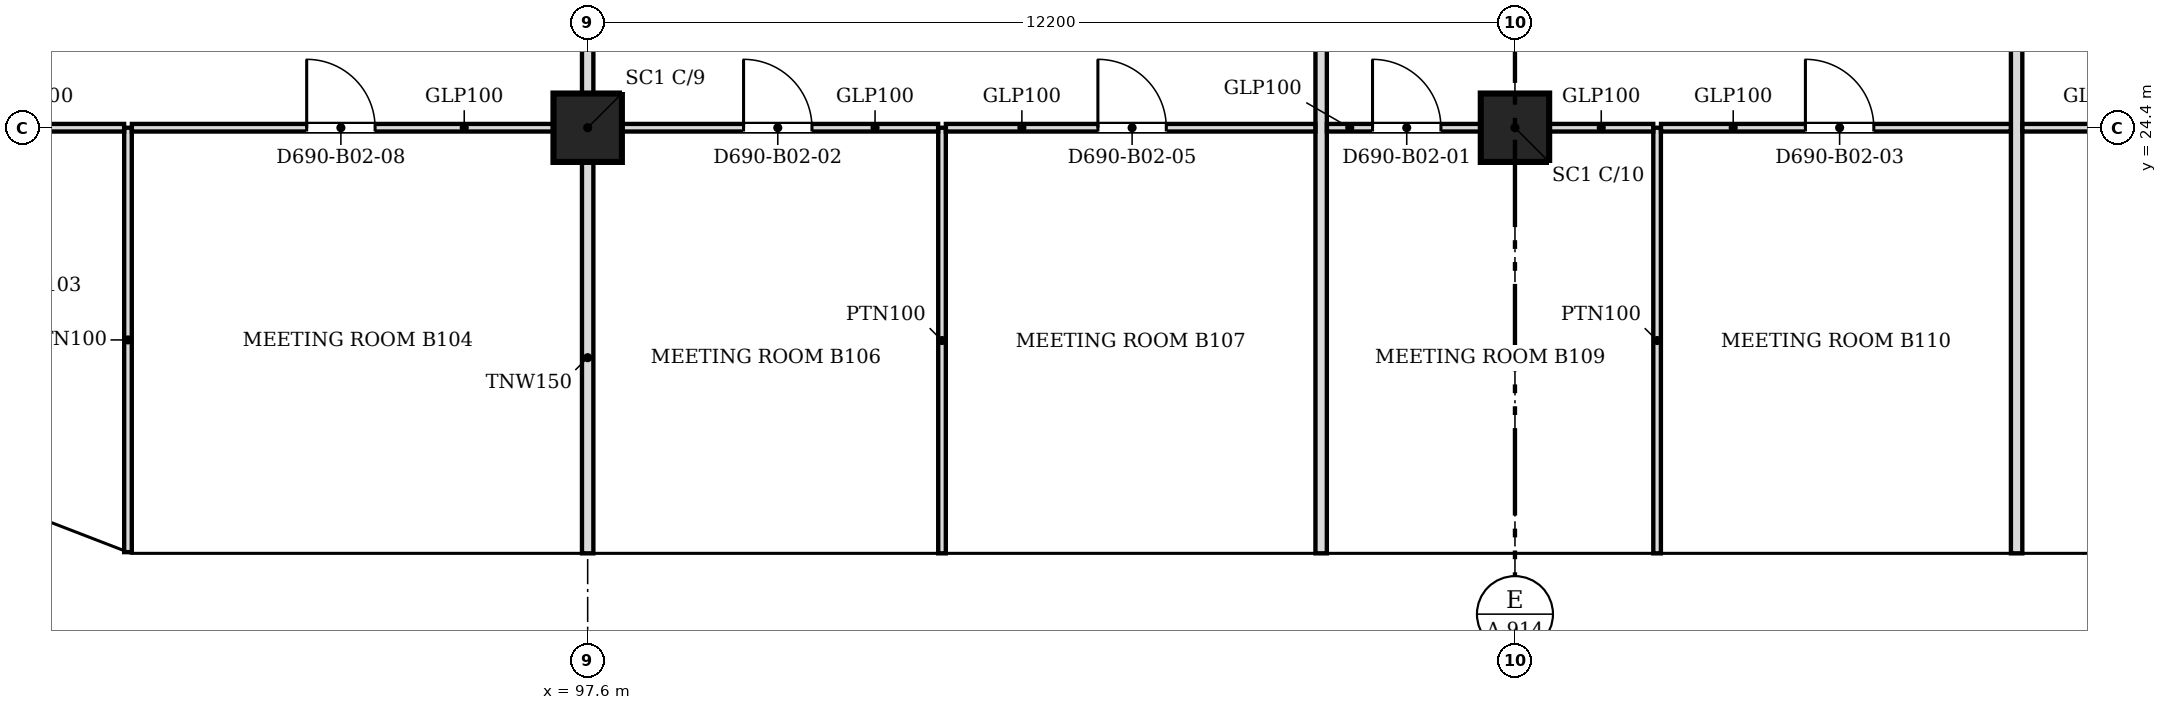
"""IFC4 building model, lengths in metres.
Left out: names, types, materials, properties, quantities, classifications, styles, units other than length and angle.
Written with IfcOpenShell. Run it as: python <this file> out.ifc"""

import sys

from ifc_helpers import new_model, si_unit, direction, frame, frame_2d, origin, origin_2d, place, context, subcontext, project, spatial, polyline, rectangle, outline, extrude, faceted_brep, source, transform, mapped, element, fill, save


model = new_model("IFC4")
c1 = context("Model", 3, precision=1e-05, world=origin(), true_north=direction((0.0, 1.0)))
c2 = subcontext(c1, "Body", "Model", "MODEL_VIEW")
j1 = project(units=[si_unit("LENGTHUNIT", "METRE"), si_unit("PLANEANGLEUNIT", "RADIAN")], contexts=[c1])
p1 = place(None, origin())
s1 = spatial("IfcSite", under=j1, at=p1, CompositionType="ELEMENT")
p2 = place(p1, origin())
s2 = spatial("IfcBuilding", under=s1, at=p2, CompositionType="ELEMENT")
p3 = place(p2, frame((0.0, 0.0, 21.3)))
s3 = spatial("IfcBuildingStorey", under=s2, at=p3, CompositionType="ELEMENT", Elevation=21.3)
for number, where, z_axis, x_axis in (
    (1, (97.6, 24.4, 0.0), (0.0, 0.0, 1.0), (1.0, 0.0, 0.0)),
    (2, (109.8, 24.4, 0.0), (0.0, 0.0, 1.0), (1.0, 0.0, 0.0)),
):
    element("IfcColumn", number, at=place(p3, frame(where, z_axis=z_axis, x_axis=x_axis)), inside=s3, PredefinedType="COLUMN", context=c2, shape_type="SweptSolid", body=[
        extrude(rectangle(XDim=0.9, YDim=0.9, at=origin_2d()), origin(), (0.0, 0.0, 1.0), 4.3),
    ])
m1 = source(origin(), c2, "Body", "Brep", [
    faceted_brep([(3.003, -0.25, 0.0), (6.053, -0.25, 4.5), (3.003, -0.25, 9.0), (0.0, -0.25, 4.5), (0.047, 0.25, 4.57), (3.003, 0.25, 9.0), (6.053, 0.25, 4.5), (3.003, 0.25, 0.0), (0.047, 0.25, 4.43), (0.0, 0.0, 4.5)], [[[0, 1, 2, 3]], [[4, 5, 6, 7, 8]], [[7, 6, 1, 0]], [[6, 5, 2, 1]], [[5, 4, 9, 3, 2]], [[8, 7, 0, 3, 9]], [[8, 9, 4]]]),
])
p4 = place(p3, frame((91.547, 18.55, -4.5), z_axis=(0.0, 0.0, 1.0), x_axis=(1.0, 0.0, 0.0)))
e3 = element("IfcWall", 3, at=p4, inside=s3, PredefinedType="SOLIDWALL", context=c2, shape_type="MappedRepresentation", body=[
    mapped(m1, transform((0.0, 0.0, 0.0), scale=1.0)),
])
m2 = source(origin(), c2, "Body", "SweptSolid", [
    extrude(outline(polyline([(3.005, 0.448), (5.751, 4.5), (3.005, 8.552), (0.301, 4.5), (3.005, 0.448)])), frame((0.0, 0.26, 0.0), z_axis=(0.0, -1.0, 0.0), x_axis=(1.0, 0.0, 0.0)), (0.0, 0.0, 1.0), 0.52),
])
p5 = place(p4, origin())
e4 = element("IfcOpeningElement", 4, at=p5, cuts=e3, PredefinedType="OPENING", context=c2, shape_type="MappedRepresentation", body=[
    mapped(m2, transform((0.0, 0.0, 0.0), scale=1.0)),
])
m3 = source(origin(), c2, "Body", "Brep", [
    faceted_brep([(3.05, -0.25, 0.0), (6.1, -0.25, 4.5), (6.1, -0.25, 4.5), (3.05, -0.25, 9.0), (0.0, -0.25, 4.5), (0.0, 0.25, 4.5), (3.05, 0.25, 9.0), (6.1, 0.25, 4.5), (6.1, 0.25, 4.5), (3.05, 0.25, 0.0)], [[[0, 1, 2, 3, 4]], [[5, 6, 7, 8, 9]], [[9, 8, 1, 0]], [[7, 6, 3, 2]], [[6, 5, 4, 3]], [[5, 9, 0, 4]], [[1, 8, 7, 2]]]),
])
p6 = place(p3, frame((97.6, 18.55, -4.5), z_axis=(0.0, 0.0, 1.0), x_axis=(1.0, 0.0, 0.0)))
e5 = element("IfcWall", 5, at=p6, inside=s3, PredefinedType="SOLIDWALL", context=c2, shape_type="MappedRepresentation", body=[
    mapped(m3, transform((0.0, 0.0, 0.0), scale=1.0)),
])
m4 = source(origin(), c2, "Body", "SweptSolid", [
    extrude(outline(polyline([(3.05, 0.446), (5.798, 4.5), (3.05, 8.554), (0.302, 4.5), (3.05, 0.446)])), frame((0.0, 0.26, 0.0), z_axis=(0.0, -1.0, 0.0), x_axis=(1.0, 0.0, 0.0)), (0.0, 0.0, 1.0), 0.52),
])
p7 = place(p6, origin())
e6 = element("IfcOpeningElement", 6, at=p7, cuts=e5, PredefinedType="OPENING", context=c2, shape_type="MappedRepresentation", body=[
    mapped(m4, transform((0.0, 0.0, 0.0), scale=1.0)),
])
m5 = source(origin(), c2, "Body", "SweptSolid", [
    extrude(outline(polyline([(3.05, 0.0), (6.1, 4.5), (3.05, 9.0), (0.0, 4.5), (3.05, 0.0)])), frame((0.0, 0.25, 0.0), z_axis=(0.0, -1.0, 0.0), x_axis=(1.0, 0.0, 0.0)), (0.0, 0.0, 1.0), 0.5),
])
p8 = place(p3, frame((103.7, 18.55, -4.5), z_axis=(0.0, 0.0, 1.0), x_axis=(1.0, 0.0, 0.0)))
e7 = element("IfcWall", 7, at=p8, inside=s3, PredefinedType="SOLIDWALL", context=c2, shape_type="MappedRepresentation", body=[
    mapped(m5, transform((0.0, 0.0, 0.0), scale=1.0)),
])
p9 = place(p8, origin())
e8 = element("IfcOpeningElement", 8, at=p9, cuts=e7, PredefinedType="OPENING", context=c2, shape_type="MappedRepresentation", body=[
    mapped(m4, transform((0.0, 0.0, 0.0), scale=1.0)),
])
p10 = place(p3, frame((109.8, 18.55, -4.5), z_axis=(0.0, 0.0, 1.0), x_axis=(1.0, 0.0, 0.0)))
e9 = element("IfcWall", 9, at=p10, inside=s3, PredefinedType="SOLIDWALL", context=c2, shape_type="MappedRepresentation", body=[
    mapped(m3, transform((0.0, 0.0, 0.0), scale=1.0)),
])
p11 = place(p10, origin())
e10 = element("IfcOpeningElement", 10, at=p11, cuts=e9, PredefinedType="OPENING", context=c2, shape_type="MappedRepresentation", body=[
    mapped(m4, transform((0.0, 0.0, 0.0), scale=1.0)),
])
p12 = place(p3, frame((115.9, 18.55, -4.5), z_axis=(0.0, 0.0, 1.0), x_axis=(1.0, 0.0, 0.0)))
e11 = element("IfcWall", 11, at=p12, inside=s3, PredefinedType="SOLIDWALL", context=c2, shape_type="MappedRepresentation", body=[
    mapped(m5, transform((0.0, 0.0, 0.0), scale=1.0)),
])
p13 = place(p12, origin())
e12 = element("IfcOpeningElement", 12, at=p13, cuts=e11, PredefinedType="OPENING", context=c2, shape_type="MappedRepresentation", body=[
    mapped(m4, transform((0.0, 0.0, 0.0), scale=1.0)),
])
m6 = source(origin(), c2, "Body", "Brep", [
    faceted_brep([(0.053, -0.25, 0.0), (3.003, -0.25, 4.5), (0.053, -0.25, 9.0), (0.0, -0.25, 8.919), (0.0, -0.25, 0.081), (0.106, 0.25, 8.919), (2.957, 0.25, 4.571), (2.957, 0.25, 4.429), (0.106, 0.25, 0.081), (3.003, 0.0, 4.5), (0.053, 0.0, 0.0), (0.053, 0.0, 9.0)], [[[0, 1, 2, 3, 4]], [[5, 6, 7, 8]], [[8, 7, 9, 1, 0, 10]], [[6, 5, 11, 2, 1, 9]], [[3, 2, 11]], [[10, 0, 4]], [[8, 10, 4, 3, 11, 5]], [[9, 7, 6]]]),
])
p14 = place(p3, frame((88.744, 19.631, -4.5), z_axis=(0.0, 0.0, 1.0), x_axis=(0.932997369089, -0.359883188373, 0.0)))
e13 = element("IfcWall", 13, at=p14, inside=s3, PredefinedType="SOLIDWALL", context=c2, shape_type="MappedRepresentation", body=[
    mapped(m6, transform((0.0, 0.0, 0.0), scale=1.0)),
])
m7 = source(origin(), c2, "Body", "SweptSolid", [
    extrude(outline(polyline([(0.253, 0.761), (2.705, 4.5), (0.253, 8.239), (0.253, 0.761)])), frame((0.0, 0.26, 0.0), z_axis=(0.0, -1.0, 0.0), x_axis=(1.0, 0.0, 0.0)), (0.0, 0.0, 1.0), 0.52),
])
p15 = place(p14, origin())
e14 = element("IfcOpeningElement", 14, at=p15, cuts=e13, PredefinedType="OPENING", context=c2, shape_type="MappedRepresentation", body=[
    mapped(m7, transform((0.0, 0.0, 0.0), scale=1.0)),
])
m8 = source(origin(), c2, "Body", "Brep", [
    faceted_brep([(0.047, -0.25, 0.0), (3.05, -0.25, 4.5), (0.0, -0.25, 4.5), (0.0, -0.25, 0.071), (0.093, 0.25, 4.5), (3.05, 0.25, 4.5), (0.093, 0.25, 0.07), (0.047, 0.0, 0.0)], [[[0, 1, 2, 3]], [[4, 5, 6]], [[6, 5, 1, 0, 7]], [[5, 4, 2, 1]], [[7, 0, 3]], [[6, 7, 3, 2, 4]]]),
])
p16 = place(p3, frame((91.5, 18.55, 0.0), z_axis=(0.0, 0.0, 1.0), x_axis=(1.0, 0.0, 0.0)))
e15 = element("IfcWall", 15, at=p16, inside=s3, PredefinedType="SOLIDWALL", context=c2, shape_type="MappedRepresentation", body=[
    mapped(m8, transform((0.0, 0.0, 0.0), scale=1.0)),
])
m9 = source(origin(), c2, "Body", "SweptSolid", [
    extrude(outline(polyline([(0.247, 0.75), (2.583, 4.25), (0.247, 4.25), (0.247, 0.75)])), frame((0.0, 0.26, 0.0), z_axis=(0.0, -1.0, 0.0), x_axis=(1.0, 0.0, 0.0)), (0.0, 0.0, 1.0), 0.52),
])
p17 = place(p16, origin())
e16 = element("IfcOpeningElement", 16, at=p17, cuts=e15, PredefinedType="OPENING", context=c2, shape_type="MappedRepresentation", body=[
    mapped(m9, transform((0.0, 0.0, 0.0), scale=1.0)),
])
m10 = source(origin(), c2, "Body", "Brep", [
    faceted_brep([(2.95, -0.25, 0.0), (2.997, -0.25, 0.07), (2.997, -0.25, 4.5), (0.0, -0.25, 4.5), (0.053, 0.25, 4.5), (2.904, 0.25, 4.5), (2.904, 0.25, 0.071), (0.053, 0.25, 4.419), (2.95, 0.0, 0.0), (0.0, 0.0, 4.5)], [[[0, 1, 2, 3]], [[4, 5, 6, 7]], [[1, 0, 8]], [[5, 4, 9, 3, 2]], [[7, 6, 8, 0, 3, 9]], [[7, 9, 4]], [[1, 8, 6, 5, 2]]]),
])
p18 = place(p3, frame((88.794, 19.612, 0.0), z_axis=(0.0, 0.0, 1.0), x_axis=(0.933000876937, -0.359874094142, 0.0)))
e17 = element("IfcWall", 17, at=p18, inside=s3, PredefinedType="SOLIDWALL", context=c2, shape_type="MappedRepresentation", body=[
    mapped(m10, transform((0.0, 0.0, 0.0), scale=1.0)),
])
m11 = source(origin(), c2, "Body", "SweptSolid", [
    extrude(outline(polyline([(2.75, 4.25), (0.463, 4.25), (2.75, 0.761), (2.75, 4.25)])), frame((0.0, 0.26, 0.0), z_axis=(0.0, -1.0, 0.0), x_axis=(1.0, 0.0, 0.0)), (0.0, 0.0, 1.0), 0.52),
])
p19 = place(p18, origin())
e18 = element("IfcOpeningElement", 18, at=p19, cuts=e17, PredefinedType="OPENING", context=c2, shape_type="MappedRepresentation", body=[
    mapped(m11, transform((0.0, 0.0, 0.0), scale=1.0)),
])
m12 = source(origin(), c2, "Body", "Brep", [
    faceted_brep([(3.05, -0.25, 0.0), (6.1, -0.25, 4.5), (6.1, -0.25, 4.5), (0.0, -0.25, 4.5), (0.0, 0.25, 4.5), (6.1, 0.25, 4.5), (6.1, 0.25, 4.5), (3.05, 0.25, 0.0)], [[[0, 1, 2, 3]], [[4, 5, 6, 7]], [[7, 6, 1, 0]], [[5, 4, 3, 2]], [[4, 7, 0, 3]], [[1, 6, 5, 2]]]),
])
p20 = place(p3, frame((94.55, 18.55, 0.0), z_axis=(0.0, 0.0, 1.0), x_axis=(1.0, 0.0, 0.0)))
e19 = element("IfcWall", 19, at=p20, inside=s3, PredefinedType="SOLIDWALL", context=c2, shape_type="MappedRepresentation", body=[
    mapped(m12, transform((0.0, 0.0, 0.0), scale=1.0)),
])
m13 = source(origin(), c2, "Body", "SweptSolid", [
    extrude(outline(polyline([(3.05, 0.446), (5.629, 4.25), (0.471, 4.25), (3.05, 0.446)])), frame((0.0, 0.26, 0.0), z_axis=(0.0, -1.0, 0.0), x_axis=(1.0, 0.0, 0.0)), (0.0, 0.0, 1.0), 0.52),
])
p21 = place(p20, origin())
e20 = element("IfcOpeningElement", 20, at=p21, cuts=e19, PredefinedType="OPENING", context=c2, shape_type="MappedRepresentation", body=[
    mapped(m13, transform((0.0, 0.0, 0.0), scale=1.0)),
])
m14 = source(origin(), c2, "Body", "SweptSolid", [
    extrude(outline(polyline([(3.05, 0.0), (6.1, 4.5), (0.0, 4.5), (3.05, 0.0)])), frame((0.0, 0.25, 0.0), z_axis=(0.0, -1.0, 0.0), x_axis=(1.0, 0.0, 0.0)), (0.0, 0.0, 1.0), 0.5),
])
p22 = place(p3, frame((100.65, 18.55, 0.0), z_axis=(0.0, 0.0, 1.0), x_axis=(1.0, 0.0, 0.0)))
e21 = element("IfcWall", 21, at=p22, inside=s3, PredefinedType="SOLIDWALL", context=c2, shape_type="MappedRepresentation", body=[
    mapped(m14, transform((0.0, 0.0, 0.0), scale=1.0)),
])
p23 = place(p22, origin())
e22 = element("IfcOpeningElement", 22, at=p23, cuts=e21, PredefinedType="OPENING", context=c2, shape_type="MappedRepresentation", body=[
    mapped(m13, transform((0.0, 0.0, 0.0), scale=1.0)),
])
p24 = place(p3, frame((106.75, 18.55, 0.0), z_axis=(0.0, 0.0, 1.0), x_axis=(1.0, 0.0, 0.0)))
e23 = element("IfcWall", 23, at=p24, inside=s3, PredefinedType="SOLIDWALL", context=c2, shape_type="MappedRepresentation", body=[
    mapped(m14, transform((0.0, 0.0, 0.0), scale=1.0)),
])
p25 = place(p24, origin())
e24 = element("IfcOpeningElement", 24, at=p25, cuts=e23, PredefinedType="OPENING", context=c2, shape_type="MappedRepresentation", body=[
    mapped(m13, transform((0.0, 0.0, 0.0), scale=1.0)),
])
p26 = place(p3, frame((112.85, 18.55, 0.0), z_axis=(0.0, 0.0, 1.0), x_axis=(1.0, 0.0, 0.0)))
e25 = element("IfcWall", 25, at=p26, inside=s3, PredefinedType="SOLIDWALL", context=c2, shape_type="MappedRepresentation", body=[
    mapped(m12, transform((0.0, 0.0, 0.0), scale=1.0)),
])
p27 = place(p26, origin())
e26 = element("IfcOpeningElement", 26, at=p27, cuts=e25, PredefinedType="OPENING", context=c2, shape_type="MappedRepresentation", body=[
    mapped(m13, transform((0.0, 0.0, 0.0), scale=1.0)),
])
p28 = place(p3, frame((97.6, 18.8, 0.0), z_axis=(0.0, 0.0, 1.0), x_axis=(0.0, 1.0, 0.0)))
e27 = element("IfcWall", 27, at=p28, inside=s3, PredefinedType="PARTITIONING", context=c2, shape_type="SweptSolid", body=[
    extrude(rectangle(XDim=5.149, YDim=0.15, at=frame_2d((2.574, 0.0))), origin(), (0.0, 0.0, 1.0), 3.767),
])
p29 = place(p3, frame((102.262, 18.8, 0.0), z_axis=(0.0, 0.0, 1.0), x_axis=(0.0, 1.0, 0.0)))
e28 = element("IfcWall", 28, at=p29, inside=s3, PredefinedType="PARTITIONING", context=c2, shape_type="SweptSolid", body=[
    extrude(rectangle(XDim=5.6, YDim=0.1, at=frame_2d((2.8, 0.0))), origin(), (0.0, 0.0, 1.0), 3.767),
])
p30 = place(p3, frame((107.25, 18.8, 0.0), z_axis=(0.0, 0.0, 1.0), x_axis=(0.0, 1.0, 0.0)))
e29 = element("IfcWall", 29, at=p30, inside=s3, PredefinedType="PARTITIONING", context=c2, shape_type="SweptSolid", body=[
    extrude(rectangle(XDim=14.924, YDim=0.15, at=frame_2d((7.462, 0.0))), origin(), (0.0, 0.0, 1.0), 3.767),
])
p31 = place(p3, frame((111.67, 18.8, 0.0), z_axis=(0.0, 0.0, 1.0), x_axis=(0.0, 1.0, 0.0)))
e30 = element("IfcWall", 30, at=p31, inside=s3, PredefinedType="PARTITIONING", context=c2, shape_type="SweptSolid", body=[
    extrude(rectangle(XDim=5.6, YDim=0.1, at=frame_2d((2.8, 0.0))), origin(), (0.0, 0.0, 1.0), 3.767),
])
p32 = place(p3, frame((116.4, 18.8, 0.0), z_axis=(0.0, 0.0, 1.0), x_axis=(0.0, 1.0, 0.0)))
e31 = element("IfcWall", 31, at=p32, inside=s3, PredefinedType="PARTITIONING", context=c2, shape_type="SweptSolid", body=[
    extrude(rectangle(XDim=14.924, YDim=0.15, at=frame_2d((7.462, 0.0))), origin(), (0.0, 0.0, 1.0), 3.767),
])
p33 = place(p3, frame((91.552, 18.816, 0.0), z_axis=(0.0, 0.0, 1.0), x_axis=(0.0, 1.0, 0.0)))
e32 = element("IfcWall", 32, at=p33, inside=s3, PredefinedType="PARTITIONING", context=c2, shape_type="SweptSolid", body=[
    extrude(rectangle(XDim=5.584, YDim=0.1, at=frame_2d((2.792, 0.0))), origin(), (0.0, 0.0, 1.0), 3.767),
])
p34 = place(p3, frame((91.501, 24.4, 0.0), z_axis=(0.0, 0.0, 1.0), x_axis=(-1.0, 0.0, 0.0)))
e33 = element("IfcWall", 33, at=p34, inside=s3, PredefinedType="PARTITIONING", context=c2, shape_type="SweptSolid", body=[
    extrude(rectangle(XDim=5.565, YDim=0.1, at=frame_2d((2.783, 0.0))), origin(), (0.0, 0.0, 1.0), 3.767),
])
m15 = source(origin(), c2, "Body", "SweptSolid", [
    extrude(rectangle(XDim=0.9, YDim=2.1, at=frame_2d((0.45, 1.05))), frame((0.0, 0.06, 0.0), z_axis=(0.0, -1.0, 0.0), x_axis=(1.0, 0.0, 0.0)), (0.0, 0.0, 1.0), 0.12),
])
p35 = place(p34, frame((2.365, 0.0, 0.0)))
e34 = element("IfcOpeningElement", 34, at=p35, cuts=e33, PredefinedType="OPENING", context=c2, shape_type="MappedRepresentation", body=[
    mapped(m15, transform((0.0, 0.0, 0.0), scale=1.0)),
])
p36 = place(p3, frame((97.149, 24.4, 0.0), z_axis=(0.0, 0.0, 1.0), x_axis=(-1.0, 0.0, 0.0)))
e35 = element("IfcWall", 35, at=p36, inside=s3, PredefinedType="PARTITIONING", context=c2, shape_type="SweptSolid", body=[
    extrude(rectangle(XDim=5.546, YDim=0.1, at=frame_2d((2.773, 0.0))), origin(), (0.0, 0.0, 1.0), 3.767),
])
p37 = place(p36, frame((2.346, 0.0, 0.0)))
e36 = element("IfcOpeningElement", 36, at=p37, cuts=e35, PredefinedType="OPENING", context=c2, shape_type="MappedRepresentation", body=[
    mapped(m15, transform((0.0, 0.0, 0.0), scale=1.0)),
])
p38 = place(p3, frame((102.211, 24.4, 0.0), z_axis=(0.0, 0.0, 1.0), x_axis=(-1.0, 0.0, 0.0)))
e37 = element("IfcWall", 37, at=p38, inside=s3, PredefinedType="PARTITIONING", context=c2, shape_type="SweptSolid", body=[
    extrude(rectangle(XDim=4.16, YDim=0.1, at=frame_2d((2.08, 0.0))), origin(), (0.0, 0.0, 1.0), 3.767),
])
p39 = place(p38, frame((1.66, 0.0, 0.0)))
e38 = element("IfcOpeningElement", 38, at=p39, cuts=e37, PredefinedType="OPENING", context=c2, shape_type="MappedRepresentation", body=[
    mapped(m15, transform((0.0, 0.0, 0.0), scale=1.0)),
])
p40 = place(p3, frame((107.174, 24.4, 0.0), z_axis=(0.0, 0.0, 1.0), x_axis=(-1.0, 0.0, 0.0)))
e39 = element("IfcWall", 39, at=p40, inside=s3, PredefinedType="PARTITIONING", context=c2, shape_type="SweptSolid", body=[
    extrude(rectangle(XDim=4.861, YDim=0.1, at=frame_2d((2.431, 0.0))), origin(), (0.0, 0.0, 1.0), 3.767),
])
p41 = place(p40, frame((1.961, 0.0, 0.0)))
e40 = element("IfcOpeningElement", 40, at=p41, cuts=e39, PredefinedType="OPENING", context=c2, shape_type="MappedRepresentation", body=[
    mapped(m15, transform((0.0, 0.0, 0.0), scale=1.0)),
])
p42 = place(p3, frame((109.349, 24.4, 0.0), z_axis=(0.0, 0.0, 1.0), x_axis=(-1.0, 0.0, 0.0)))
e41 = element("IfcWall", 41, at=p42, inside=s3, PredefinedType="PARTITIONING", context=c2, shape_type="SweptSolid", body=[
    extrude(rectangle(XDim=2.023, YDim=0.1, at=frame_2d((1.012, 0.0))), origin(), (0.0, 0.0, 1.0), 3.767),
])
p43 = place(p42, frame((0.523, 0.0, 0.0)))
e42 = element("IfcOpeningElement", 42, at=p43, cuts=e41, PredefinedType="OPENING", context=c2, shape_type="MappedRepresentation", body=[
    mapped(m15, transform((0.0, 0.0, 0.0), scale=1.0)),
])
p44 = place(p3, frame((110.251, 24.4, 0.0), z_axis=(0.0, 0.0, 1.0), x_axis=(1.0, 0.0, 0.0)))
e43 = element("IfcWall", 43, at=p44, inside=s3, PredefinedType="PARTITIONING", context=c2, shape_type="SweptSolid", body=[
    extrude(rectangle(XDim=1.368, YDim=0.1, at=frame_2d((0.684, 0.0))), origin(), (0.0, 0.0, 1.0), 3.767),
])
p45 = place(p3, frame((116.324, 24.4, 0.0), z_axis=(0.0, 0.0, 1.0), x_axis=(-1.0, 0.0, 0.0)))
e44 = element("IfcWall", 44, at=p45, inside=s3, PredefinedType="PARTITIONING", context=c2, shape_type="SweptSolid", body=[
    extrude(rectangle(XDim=4.603, YDim=0.1, at=frame_2d((2.301, 0.0))), origin(), (0.0, 0.0, 1.0), 3.767),
])
p46 = place(p45, frame((1.803, 0.0, 0.0)))
e45 = element("IfcOpeningElement", 45, at=p46, cuts=e44, PredefinedType="OPENING", context=c2, shape_type="MappedRepresentation", body=[
    mapped(m15, transform((0.0, 0.0, 0.0), scale=1.0)),
])
p47 = place(p3, frame((121.549, 24.4, 0.0), z_axis=(0.0, 0.0, 1.0), x_axis=(-1.0, 0.0, 0.0)))
e46 = element("IfcWall", 46, at=p47, inside=s3, PredefinedType="PARTITIONING", context=c2, shape_type="SweptSolid", body=[
    extrude(rectangle(XDim=5.073, YDim=0.1, at=frame_2d((2.537, 0.0))), origin(), (0.0, 0.0, 1.0), 3.767),
])
p48 = place(p47, frame((2.073, 0.0, 0.0)))
e47 = element("IfcOpeningElement", 47, at=p48, cuts=e46, PredefinedType="OPENING", context=c2, shape_type="MappedRepresentation", body=[
    mapped(m15, transform((0.0, 0.0, 0.0), scale=1.0)),
])
p49 = place(p3, frame((97.6, 24.851, 0.0), z_axis=(0.0, 0.0, 1.0), x_axis=(0.0, 1.0, 0.0)))
e48 = element("IfcWall", 48, at=p49, inside=s3, PredefinedType="PARTITIONING", context=c2, shape_type="SweptSolid", body=[
    extrude(rectangle(XDim=8.873, YDim=0.15, at=frame_2d((4.437, 0.0))), origin(), (0.0, 0.0, 1.0), 3.767),
])
m16 = source(origin(), c2, "Body", "SweptSolid", [
    extrude(rectangle(XDim=0.9, YDim=2.1, at=frame_2d((0.45, 1.05))), frame((0.0, 0.025, 0.0), z_axis=(0.0, -1.0, 0.0), x_axis=(1.0, 0.0, 0.0)), (0.0, 0.0, 1.0), 0.05),
])
p50 = place(p43, origin())
e49 = element("IfcDoor", 49, at=p50, inside=s3, OperationType="SINGLE_SWING_RIGHT", PredefinedType="DOOR", context=c2, shape_type="MappedRepresentation", body=[
    mapped(m16, transform((0.0, 0.0, 0.0), scale=1.0)),
])
fill(e42, e49)
p51 = place(p39, origin())
e50 = element("IfcDoor", 50, at=p51, inside=s3, OperationType="SINGLE_SWING_RIGHT", PredefinedType="DOOR", context=c2, shape_type="MappedRepresentation", body=[
    mapped(m16, transform((0.0, 0.0, 0.0), scale=1.0)),
])
fill(e38, e50)
p52 = place(p46, origin())
e51 = element("IfcDoor", 51, at=p52, inside=s3, OperationType="SINGLE_SWING_RIGHT", PredefinedType="DOOR", context=c2, shape_type="MappedRepresentation", body=[
    mapped(m16, transform((0.0, 0.0, 0.0), scale=1.0)),
])
fill(e45, e51)
p53 = place(p41, origin())
e52 = element("IfcDoor", 52, at=p53, inside=s3, OperationType="SINGLE_SWING_RIGHT", PredefinedType="DOOR", context=c2, shape_type="MappedRepresentation", body=[
    mapped(m16, transform((0.0, 0.0, 0.0), scale=1.0)),
])
fill(e40, e52)
p54 = place(p37, origin())
e53 = element("IfcDoor", 53, at=p54, inside=s3, OperationType="SINGLE_SWING_RIGHT", PredefinedType="DOOR", context=c2, shape_type="MappedRepresentation", body=[
    mapped(m16, transform((0.0, 0.0, 0.0), scale=1.0)),
])
fill(e36, e53)
save(model, sys.argv[1])
